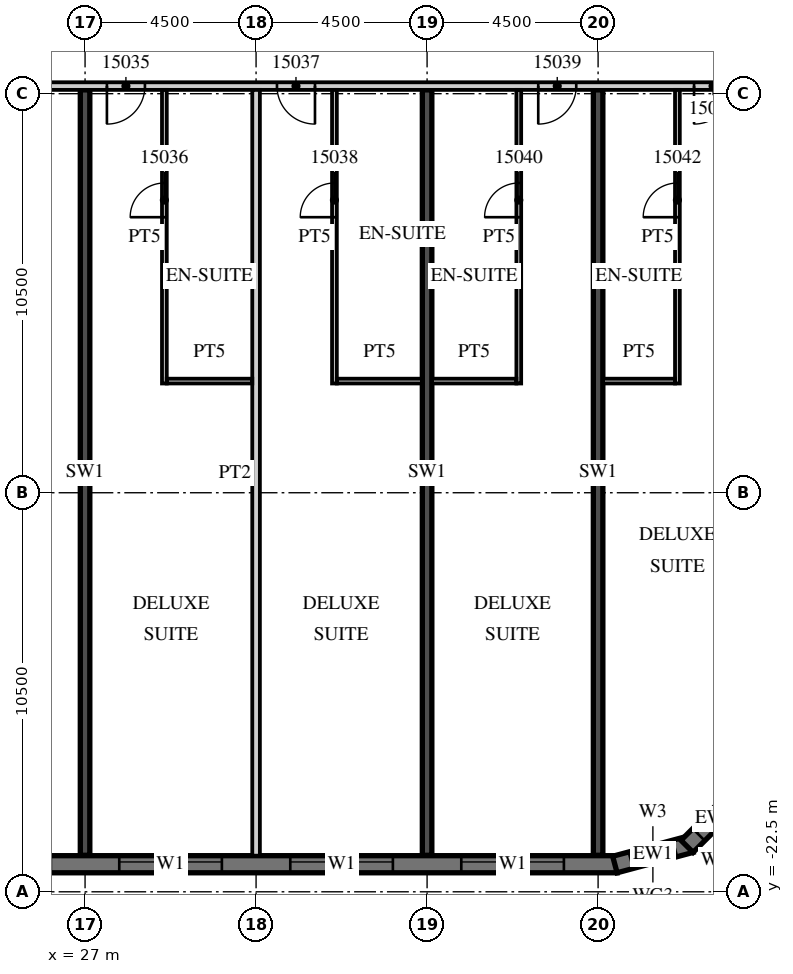
"""IFC4 building model, lengths in metres.
Left out: names, types, materials, properties, quantities, classifications, styles, units other than length and angle.
Written with IfcOpenShell. Run it as: python <this file> out.ifc"""

import sys

from ifc_helpers import new_model, si_unit, direction, frame, frame_2d, origin, place, context, subcontext, project, spatial, polyline, rectangle, outline, extrude, element, fill, save


model = new_model("IFC4")
c1 = context("Model", 3, precision=1e-05, world=origin(), true_north=direction((0.0, 1.0)))
c2 = subcontext(c1, "Body", "Model", "MODEL_VIEW")
j1 = project(units=[si_unit("LENGTHUNIT", "METRE"), si_unit("PLANEANGLEUNIT", "RADIAN")], contexts=[c1])
p1 = place(None, origin())
s1 = spatial("IfcSite", under=j1, at=p1, CompositionType="ELEMENT")
p2 = place(p1, origin())
s2 = spatial("IfcBuilding", under=s1, at=p2, CompositionType="ELEMENT")
p3 = place(p2, frame((0.0, 0.0, 79.8)))
s3 = spatial("IfcBuildingStorey", under=s2, at=p3, CompositionType="ELEMENT", Elevation=79.8)
for number, where, z_axis, x_axis in (
    (1, (27.0, -21.54, 0.0), (0.0, 0.0, 1.0), (0.0, 1.0, 0.0)),
    (2, (36.0, -21.54, 0.0), (0.0, 0.0, 1.0), (0.0, 1.0, 0.0)),
    (3, (40.5, -21.54, 0.0), (0.0, 0.0, 1.0), (0.0, 1.0, 0.0)),
):
    element("IfcWall", number, at=place(p3, frame(where, z_axis=z_axis, x_axis=x_axis)), inside=s3, PredefinedType="SHEAR", context=c2, shape_type="SweptSolid", body=[
        extrude(rectangle(XDim=20.14, YDim=0.25, at=frame_2d((10.07, 0.0))), origin(), (0.0, 0.0, 1.0), 3.3),
    ])
p4 = place(p3, frame((-13.5, -21.775, 0.0), z_axis=(0.0, 0.0, 1.0), x_axis=(1.0, 0.0, 0.0)))
e4 = element("IfcWall", 4, at=p4, inside=s3, PredefinedType="SOLIDWALL", context=c2, shape_type="SweptSolid", body=[
    extrude(rectangle(XDim=54.5, YDim=0.45, at=frame_2d((27.25, 0.0))), origin(), (0.0, 0.0, 1.0), 3.02),
])
p5 = place(p4, frame((0.9, 0.0, 0.45)))
e5 = element("IfcOpeningElement", 5, at=p5, cuts=e4, PredefinedType="OPENING", context=c2, shape_type="SweptSolid", body=[
    extrude(rectangle(XDim=2.7, YDim=2.25, at=frame_2d((1.35, 1.125))), frame((0.0, 0.235, 0.0), z_axis=(0.0, -1.0, 0.0), x_axis=(1.0, 0.0, 0.0)), (0.0, 0.0, 1.0), 0.47),
])
p6 = place(p4, frame((5.4, 0.0, 0.45)))
e6 = element("IfcOpeningElement", 6, at=p6, cuts=e4, PredefinedType="OPENING", context=c2, shape_type="SweptSolid", body=[
    extrude(rectangle(XDim=2.7, YDim=2.25, at=frame_2d((1.35, 1.125))), frame((0.0, 0.235, 0.0), z_axis=(0.0, -1.0, 0.0), x_axis=(1.0, 0.0, 0.0)), (0.0, 0.0, 1.0), 0.47),
])
p7 = place(p4, frame((9.9, 0.0, 0.45)))
e7 = element("IfcOpeningElement", 7, at=p7, cuts=e4, PredefinedType="OPENING", context=c2, shape_type="SweptSolid", body=[
    extrude(rectangle(XDim=2.7, YDim=2.25, at=frame_2d((1.35, 1.125))), frame((0.0, 0.235, 0.0), z_axis=(0.0, -1.0, 0.0), x_axis=(1.0, 0.0, 0.0)), (0.0, 0.0, 1.0), 0.47),
])
p8 = place(p4, frame((14.4, 0.0, 0.45)))
e8 = element("IfcOpeningElement", 8, at=p8, cuts=e4, PredefinedType="OPENING", context=c2, shape_type="SweptSolid", body=[
    extrude(rectangle(XDim=2.7, YDim=2.25, at=frame_2d((1.35, 1.125))), frame((0.0, 0.235, 0.0), z_axis=(0.0, -1.0, 0.0), x_axis=(1.0, 0.0, 0.0)), (0.0, 0.0, 1.0), 0.47),
])
p9 = place(p4, frame((18.9, 0.0, 0.45)))
e9 = element("IfcOpeningElement", 9, at=p9, cuts=e4, PredefinedType="OPENING", context=c2, shape_type="SweptSolid", body=[
    extrude(rectangle(XDim=2.7, YDim=2.25, at=frame_2d((1.35, 1.125))), frame((0.0, 0.235, 0.0), z_axis=(0.0, -1.0, 0.0), x_axis=(1.0, 0.0, 0.0)), (0.0, 0.0, 1.0), 0.47),
])
p10 = place(p4, frame((23.4, 0.0, 0.45)))
e10 = element("IfcOpeningElement", 10, at=p10, cuts=e4, PredefinedType="OPENING", context=c2, shape_type="SweptSolid", body=[
    extrude(rectangle(XDim=2.7, YDim=2.25, at=frame_2d((1.35, 1.125))), frame((0.0, 0.235, 0.0), z_axis=(0.0, -1.0, 0.0), x_axis=(1.0, 0.0, 0.0)), (0.0, 0.0, 1.0), 0.47),
])
p11 = place(p4, frame((27.9, 0.0, 0.45)))
e11 = element("IfcOpeningElement", 11, at=p11, cuts=e4, PredefinedType="OPENING", context=c2, shape_type="SweptSolid", body=[
    extrude(rectangle(XDim=2.7, YDim=2.25, at=frame_2d((1.35, 1.125))), frame((0.0, 0.235, 0.0), z_axis=(0.0, -1.0, 0.0), x_axis=(1.0, 0.0, 0.0)), (0.0, 0.0, 1.0), 0.47),
])
p12 = place(p4, frame((32.4, 0.0, 0.45)))
e12 = element("IfcOpeningElement", 12, at=p12, cuts=e4, PredefinedType="OPENING", context=c2, shape_type="SweptSolid", body=[
    extrude(rectangle(XDim=2.7, YDim=2.25, at=frame_2d((1.35, 1.125))), frame((0.0, 0.235, 0.0), z_axis=(0.0, -1.0, 0.0), x_axis=(1.0, 0.0, 0.0)), (0.0, 0.0, 1.0), 0.47),
])
p13 = place(p4, frame((36.9, 0.0, 0.45)))
e13 = element("IfcOpeningElement", 13, at=p13, cuts=e4, PredefinedType="OPENING", context=c2, shape_type="SweptSolid", body=[
    extrude(rectangle(XDim=2.7, YDim=2.25, at=frame_2d((1.35, 1.125))), frame((0.0, 0.235, 0.0), z_axis=(0.0, -1.0, 0.0), x_axis=(1.0, 0.0, 0.0)), (0.0, 0.0, 1.0), 0.47),
])
p14 = place(p4, frame((41.4, 0.0, 0.45)))
e14 = element("IfcOpeningElement", 14, at=p14, cuts=e4, PredefinedType="OPENING", context=c2, shape_type="SweptSolid", body=[
    extrude(rectangle(XDim=2.7, YDim=2.25, at=frame_2d((1.35, 1.125))), frame((0.0, 0.235, 0.0), z_axis=(0.0, -1.0, 0.0), x_axis=(1.0, 0.0, 0.0)), (0.0, 0.0, 1.0), 0.47),
])
p15 = place(p4, frame((45.9, 0.0, 0.45)))
e15 = element("IfcOpeningElement", 15, at=p15, cuts=e4, PredefinedType="OPENING", context=c2, shape_type="SweptSolid", body=[
    extrude(rectangle(XDim=2.7, YDim=2.25, at=frame_2d((1.35, 1.125))), frame((0.0, 0.235, 0.0), z_axis=(0.0, -1.0, 0.0), x_axis=(1.0, 0.0, 0.0)), (0.0, 0.0, 1.0), 0.47),
])
p16 = place(p4, frame((50.4, 0.0, 0.45)))
e16 = element("IfcOpeningElement", 16, at=p16, cuts=e4, PredefinedType="OPENING", context=c2, shape_type="SweptSolid", body=[
    extrude(rectangle(XDim=2.7, YDim=2.25, at=frame_2d((1.35, 1.125))), frame((0.0, 0.235, 0.0), z_axis=(0.0, -1.0, 0.0), x_axis=(1.0, 0.0, 0.0)), (0.0, 0.0, 1.0), 0.47),
])
p17 = place(p3, frame((40.942, -21.783, 0.0), z_axis=(0.0, 0.0, 1.0), x_axis=(0.965926999034, 0.25881466832, 0.0)))
e17 = element("IfcWall", 17, at=p17, inside=s3, PredefinedType="SOLIDWALL", context=c2, shape_type="SweptSolid", body=[
    extrude(outline(polyline([(0.0, -0.225), (2.071, -0.225), (1.95, 0.225), (0.121, 0.225), (0.0, -0.225)])), origin(), (0.0, 0.0, 1.0), 3.02),
])
p18 = place(p17, frame((0.435, 0.0, 0.45)))
e18 = element("IfcOpeningElement", 18, at=p18, cuts=e17, PredefinedType="OPENING", context=c2, shape_type="SweptSolid", body=[
    extrude(rectangle(XDim=1.2, YDim=2.25, at=frame_2d((0.6, 1.125))), frame((0.0, 0.235, 0.0), z_axis=(0.0, -1.0, 0.0), x_axis=(1.0, 0.0, 0.0)), (0.0, 0.0, 1.0), 0.47),
])
p19 = place(p3, frame((42.841, -21.305, 0.0), z_axis=(0.0, 0.0, 1.0), x_axis=(0.707106781187, 0.707106781187, 0.0)))
e19 = element("IfcWall", 19, at=p19, inside=s3, PredefinedType="SOLIDWALL", context=c2, shape_type="SweptSolid", body=[
    extrude(outline(polyline([(0.0, -0.225), (2.071, -0.225), (1.95, 0.225), (0.121, 0.225), (0.0, -0.225)])), origin(), (0.0, 0.0, 1.0), 3.02),
])
p20 = place(p19, frame((0.435, 0.0, 0.45)))
e20 = element("IfcOpeningElement", 20, at=p20, cuts=e19, PredefinedType="OPENING", context=c2, shape_type="SweptSolid", body=[
    extrude(rectangle(XDim=1.2, YDim=2.25, at=frame_2d((0.6, 1.125))), frame((0.0, 0.235, 0.0), z_axis=(0.0, -1.0, 0.0), x_axis=(1.0, 0.0, 0.0)), (0.0, 0.0, 1.0), 0.47),
])
p21 = place(p3, frame((-13.5, -1.3, 0.0), z_axis=(0.0, 0.0, 1.0), x_axis=(1.0, 0.0, 0.0)))
e21 = element("IfcWall", 21, at=p21, inside=s3, PredefinedType="PARTITIONING", context=c2, shape_type="SweptSolid", body=[
    extrude(rectangle(XDim=58.05, YDim=0.2, at=frame_2d((29.025, 0.0))), origin(), (0.0, 0.0, 1.0), 3.02),
])
p22 = place(p21, frame((2.925, 0.0, 0.0)))
e22 = element("IfcOpeningElement", 22, at=p22, cuts=e21, PredefinedType="OPENING", context=c2, shape_type="SweptSolid", body=[
    extrude(rectangle(XDim=1.0, YDim=2.1, at=frame_2d((0.5, 1.05))), frame((0.0, 0.11, 0.0), z_axis=(0.0, -1.0, 0.0), x_axis=(1.0, 0.0, 0.0)), (0.0, 0.0, 1.0), 0.22),
])
p23 = place(p21, frame((7.45, 0.0, 0.0)))
e23 = element("IfcOpeningElement", 23, at=p23, cuts=e21, PredefinedType="OPENING", context=c2, shape_type="SweptSolid", body=[
    extrude(rectangle(XDim=1.0, YDim=2.1, at=frame_2d((0.5, 1.05))), frame((0.0, 0.11, 0.0), z_axis=(0.0, -1.0, 0.0), x_axis=(1.0, 0.0, 0.0)), (0.0, 0.0, 1.0), 0.22),
])
p24 = place(p21, frame((11.925, 0.0, 0.0)))
e24 = element("IfcOpeningElement", 24, at=p24, cuts=e21, PredefinedType="OPENING", context=c2, shape_type="SweptSolid", body=[
    extrude(rectangle(XDim=1.0, YDim=2.1, at=frame_2d((0.5, 1.05))), frame((0.0, 0.11, 0.0), z_axis=(0.0, -1.0, 0.0), x_axis=(1.0, 0.0, 0.0)), (0.0, 0.0, 1.0), 0.22),
])
p25 = place(p21, frame((15.938, 0.0, 0.0)))
e25 = element("IfcOpeningElement", 25, at=p25, cuts=e21, PredefinedType="OPENING", context=c2, shape_type="SweptSolid", body=[
    extrude(rectangle(XDim=1.2, YDim=2.1, at=frame_2d((0.6, 1.05))), frame((0.0, 0.11, 0.0), z_axis=(0.0, -1.0, 0.0), x_axis=(1.0, 0.0, 0.0)), (0.0, 0.0, 1.0), 0.22),
])
p26 = place(p21, frame((25.45, 0.0, 0.0)))
e26 = element("IfcOpeningElement", 26, at=p26, cuts=e21, PredefinedType="OPENING", context=c2, shape_type="SweptSolid", body=[
    extrude(rectangle(XDim=1.0, YDim=2.1, at=frame_2d((0.5, 1.05))), frame((0.0, 0.11, 0.0), z_axis=(0.0, -1.0, 0.0), x_axis=(1.0, 0.0, 0.0)), (0.0, 0.0, 1.0), 0.22),
])
p27 = place(p21, frame((29.925, 0.0, 0.0)))
e27 = element("IfcOpeningElement", 27, at=p27, cuts=e21, PredefinedType="OPENING", context=c2, shape_type="SweptSolid", body=[
    extrude(rectangle(XDim=1.0, YDim=2.1, at=frame_2d((0.5, 1.05))), frame((0.0, 0.11, 0.0), z_axis=(0.0, -1.0, 0.0), x_axis=(1.0, 0.0, 0.0)), (0.0, 0.0, 1.0), 0.22),
])
p28 = place(p21, frame((36.862, 0.0, 0.0)))
e28 = element("IfcOpeningElement", 28, at=p28, cuts=e21, PredefinedType="OPENING", context=c2, shape_type="SweptSolid", body=[
    extrude(rectangle(XDim=1.2, YDim=2.1, at=frame_2d((0.6, 1.05))), frame((0.0, 0.11, 0.0), z_axis=(0.0, -1.0, 0.0), x_axis=(1.0, 0.0, 0.0)), (0.0, 0.0, 1.0), 0.22),
])
p29 = place(p21, frame((41.075, 0.0, 0.0)))
e29 = element("IfcOpeningElement", 29, at=p29, cuts=e21, PredefinedType="OPENING", context=c2, shape_type="SweptSolid", body=[
    extrude(rectangle(XDim=1.0, YDim=2.1, at=frame_2d((0.5, 1.05))), frame((0.0, 0.11, 0.0), z_axis=(0.0, -1.0, 0.0), x_axis=(1.0, 0.0, 0.0)), (0.0, 0.0, 1.0), 0.22),
])
p30 = place(p21, frame((45.55, 0.0, 0.0)))
e30 = element("IfcOpeningElement", 30, at=p30, cuts=e21, PredefinedType="OPENING", context=c2, shape_type="SweptSolid", body=[
    extrude(rectangle(XDim=1.0, YDim=2.1, at=frame_2d((0.5, 1.05))), frame((0.0, 0.11, 0.0), z_axis=(0.0, -1.0, 0.0), x_axis=(1.0, 0.0, 0.0)), (0.0, 0.0, 1.0), 0.22),
])
p31 = place(p21, frame((52.425, 0.0, 0.0)))
e31 = element("IfcOpeningElement", 31, at=p31, cuts=e21, PredefinedType="OPENING", context=c2, shape_type="SweptSolid", body=[
    extrude(rectangle(XDim=1.0, YDim=2.1, at=frame_2d((0.5, 1.05))), frame((0.0, 0.11, 0.0), z_axis=(0.0, -1.0, 0.0), x_axis=(1.0, 0.0, 0.0)), (0.0, 0.0, 1.0), 0.22),
])
p32 = place(p21, frame((56.525, 0.0, 0.0)))
e32 = element("IfcOpeningElement", 32, at=p32, cuts=e21, PredefinedType="OPENING", context=c2, shape_type="SweptSolid", body=[
    extrude(rectangle(XDim=1.0, YDim=2.1, at=frame_2d((0.5, 1.05))), frame((0.0, 0.11, 0.0), z_axis=(0.0, -1.0, 0.0), x_axis=(1.0, 0.0, 0.0)), (0.0, 0.0, 1.0), 0.22),
])
p33 = place(p3, frame((31.5, -21.55, 0.0), z_axis=(0.0, 0.0, 1.0), x_axis=(0.0, 1.0, 0.0)))
e33 = element("IfcWall", 33, at=p33, inside=s3, PredefinedType="PARTITIONING", context=c2, shape_type="SweptSolid", body=[
    extrude(rectangle(XDim=20.15, YDim=0.2, at=frame_2d((10.075, 0.0))), origin(), (0.0, 0.0, 1.0), 3.02),
])
p34 = place(p3, frame((29.087, -9.125, 0.0), z_axis=(0.0, 0.0, 1.0), x_axis=(0.0, 1.0, 0.0)))
e34 = element("IfcWall", 34, at=p34, inside=s3, PredefinedType="PARTITIONING", context=c2, shape_type="SweptSolid", body=[
    extrude(rectangle(XDim=7.725, YDim=0.125, at=frame_2d((3.863, 0.0))), origin(), (0.0, 0.0, 1.0), 3.02),
])
p35 = place(p34, frame((4.375, 0.0, 0.0)))
e35 = element("IfcOpeningElement", 35, at=p35, cuts=e34, PredefinedType="OPENING", context=c2, shape_type="SweptSolid", body=[
    extrude(rectangle(XDim=0.9, YDim=2.1, at=frame_2d((0.45, 1.05))), frame((0.0, 0.073, 0.0), z_axis=(0.0, -1.0, 0.0), x_axis=(1.0, 0.0, 0.0)), (0.0, 0.0, 1.0), 0.145),
])
p36 = place(p3, frame((29.15, -9.062, 0.0), z_axis=(0.0, 0.0, 1.0), x_axis=(1.0, 0.0, 0.0)))
e36 = element("IfcWall", 36, at=p36, inside=s3, PredefinedType="PARTITIONING", context=c2, shape_type="SweptSolid", body=[
    extrude(rectangle(XDim=2.25, YDim=0.125, at=frame_2d((1.125, 0.0))), origin(), (0.0, 0.0, 1.0), 3.02),
])
p37 = place(p3, frame((33.562, -9.125, 0.0), z_axis=(0.0, 0.0, 1.0), x_axis=(0.0, 1.0, 0.0)))
e37 = element("IfcWall", 37, at=p37, inside=s3, PredefinedType="PARTITIONING", context=c2, shape_type="SweptSolid", body=[
    extrude(rectangle(XDim=7.725, YDim=0.125, at=frame_2d((3.863, 0.0))), origin(), (0.0, 0.0, 1.0), 3.02),
])
p38 = place(p37, frame((4.375, 0.0, 0.0)))
e38 = element("IfcOpeningElement", 38, at=p38, cuts=e37, PredefinedType="OPENING", context=c2, shape_type="SweptSolid", body=[
    extrude(rectangle(XDim=0.9, YDim=2.1, at=frame_2d((0.45, 1.05))), frame((0.0, 0.073, 0.0), z_axis=(0.0, -1.0, 0.0), x_axis=(1.0, 0.0, 0.0)), (0.0, 0.0, 1.0), 0.145),
])
p39 = place(p3, frame((33.625, -9.062, 0.0), z_axis=(0.0, 0.0, 1.0), x_axis=(1.0, 0.0, 0.0)))
e39 = element("IfcWall", 39, at=p39, inside=s3, PredefinedType="PARTITIONING", context=c2, shape_type="SweptSolid", body=[
    extrude(rectangle(XDim=2.25, YDim=0.125, at=frame_2d((1.125, 0.0))), origin(), (0.0, 0.0, 1.0), 3.02),
])
p40 = place(p3, frame((38.413, -9.125, 0.0), z_axis=(0.0, 0.0, 1.0), x_axis=(0.0, 1.0, 0.0)))
e40 = element("IfcWall", 40, at=p40, inside=s3, PredefinedType="PARTITIONING", context=c2, shape_type="SweptSolid", body=[
    extrude(rectangle(XDim=7.725, YDim=0.125, at=frame_2d((3.863, 0.0))), origin(), (0.0, 0.0, 1.0), 3.02),
])
p41 = place(p40, frame((4.375, 0.0, 0.0)))
e41 = element("IfcOpeningElement", 41, at=p41, cuts=e40, PredefinedType="OPENING", context=c2, shape_type="SweptSolid", body=[
    extrude(rectangle(XDim=0.9, YDim=2.1, at=frame_2d((0.45, 1.05))), frame((0.0, 0.073, 0.0), z_axis=(0.0, -1.0, 0.0), x_axis=(1.0, 0.0, 0.0)), (0.0, 0.0, 1.0), 0.145),
])
p42 = place(p3, frame((36.125, -9.062, 0.0), z_axis=(0.0, 0.0, 1.0), x_axis=(1.0, 0.0, 0.0)))
e42 = element("IfcWall", 42, at=p42, inside=s3, PredefinedType="PARTITIONING", context=c2, shape_type="SweptSolid", body=[
    extrude(rectangle(XDim=2.225, YDim=0.125, at=frame_2d((1.113, 0.0))), origin(), (0.0, 0.0, 1.0), 3.02),
])
p43 = place(p3, frame((42.587, -9.125, 0.0), z_axis=(0.0, 0.0, 1.0), x_axis=(0.0, 1.0, 0.0)))
e43 = element("IfcWall", 43, at=p43, inside=s3, PredefinedType="PARTITIONING", context=c2, shape_type="SweptSolid", body=[
    extrude(rectangle(XDim=7.725, YDim=0.125, at=frame_2d((3.863, 0.0))), origin(), (0.0, 0.0, 1.0), 3.02),
])
p44 = place(p43, frame((4.375, 0.0, 0.0)))
e44 = element("IfcOpeningElement", 44, at=p44, cuts=e43, PredefinedType="OPENING", context=c2, shape_type="SweptSolid", body=[
    extrude(rectangle(XDim=0.9, YDim=2.1, at=frame_2d((0.45, 1.05))), frame((0.0, 0.073, 0.0), z_axis=(0.0, -1.0, 0.0), x_axis=(1.0, 0.0, 0.0)), (0.0, 0.0, 1.0), 0.145),
])
p45 = place(p3, frame((40.625, -9.062, 0.0), z_axis=(0.0, 0.0, 1.0), x_axis=(1.0, 0.0, 0.0)))
e45 = element("IfcWall", 45, at=p45, inside=s3, PredefinedType="PARTITIONING", context=c2, shape_type="SweptSolid", body=[
    extrude(rectangle(XDim=1.9, YDim=0.125, at=frame_2d((0.95, 0.0))), origin(), (0.0, 0.0, 1.0), 3.02),
])
p46 = place(p14, origin())
e46 = element("IfcWindow", 46, at=p46, inside=s3, PartitioningType="SINGLE_PANEL", PredefinedType="WINDOW", context=c2, shape_type="SweptSolid", body=[
    extrude(rectangle(XDim=2.7, YDim=2.25, at=frame_2d((1.35, 1.125))), frame((0.0, 0.09, 0.0), z_axis=(0.0, -1.0, 0.0), x_axis=(1.0, 0.0, 0.0)), (0.0, 0.0, 1.0), 0.06),
])
fill(e14, e46)
p47 = place(p15, origin())
e47 = element("IfcWindow", 47, at=p47, inside=s3, PartitioningType="SINGLE_PANEL", PredefinedType="WINDOW", context=c2, shape_type="SweptSolid", body=[
    extrude(rectangle(XDim=2.7, YDim=2.25, at=frame_2d((1.35, 1.125))), frame((0.0, 0.09, 0.0), z_axis=(0.0, -1.0, 0.0), x_axis=(1.0, 0.0, 0.0)), (0.0, 0.0, 1.0), 0.06),
])
fill(e15, e47)
p48 = place(p16, origin())
e48 = element("IfcWindow", 48, at=p48, inside=s3, PartitioningType="SINGLE_PANEL", PredefinedType="WINDOW", context=c2, shape_type="SweptSolid", body=[
    extrude(rectangle(XDim=2.7, YDim=2.25, at=frame_2d((1.35, 1.125))), frame((0.0, 0.09, 0.0), z_axis=(0.0, -1.0, 0.0), x_axis=(1.0, 0.0, 0.0)), (0.0, 0.0, 1.0), 0.06),
])
fill(e16, e48)
p49 = place(p18, origin())
e49 = element("IfcWindow", 49, at=p49, inside=s3, PartitioningType="SINGLE_PANEL", PredefinedType="WINDOW", context=c2, shape_type="SweptSolid", body=[
    extrude(rectangle(XDim=1.2, YDim=2.25, at=frame_2d((0.6, 1.125))), frame((0.0, 0.09, 0.0), z_axis=(0.0, -1.0, 0.0), x_axis=(1.0, 0.0, 0.0)), (0.0, 0.0, 1.0), 0.06),
])
fill(e18, e49)
p50 = place(p20, origin())
e50 = element("IfcWindow", 50, at=p50, inside=s3, PartitioningType="SINGLE_PANEL", PredefinedType="WINDOW", context=c2, shape_type="SweptSolid", body=[
    extrude(rectangle(XDim=1.2, YDim=2.25, at=frame_2d((0.6, 1.125))), frame((0.0, 0.09, 0.0), z_axis=(0.0, -1.0, 0.0), x_axis=(1.0, 0.0, 0.0)), (0.0, 0.0, 1.0), 0.06),
])
fill(e20, e50)
p51 = place(p29, origin())
e51 = element("IfcDoor", 51, at=p51, inside=s3, OperationType="SINGLE_SWING_LEFT", PredefinedType="DOOR", context=c2, shape_type="SweptSolid", body=[
    extrude(rectangle(XDim=1.0, YDim=2.1, at=frame_2d((0.5, 1.05))), frame((0.0, 0.025, 0.0), z_axis=(0.0, -1.0, 0.0), x_axis=(1.0, 0.0, 0.0)), (0.0, 0.0, 1.0), 0.05),
])
fill(e29, e51)
p52 = place(p35, origin())
e52 = element("IfcDoor", 52, at=p52, inside=s3, OperationType="SINGLE_SWING_LEFT", PredefinedType="DOOR", context=c2, shape_type="SweptSolid", body=[
    extrude(rectangle(XDim=0.9, YDim=2.1, at=frame_2d((0.45, 1.05))), frame((0.0, 0.025, 0.0), z_axis=(0.0, -1.0, 0.0), x_axis=(1.0, 0.0, 0.0)), (0.0, 0.0, 1.0), 0.05),
])
fill(e35, e52)
p53 = place(p30, origin())
e53 = element("IfcDoor", 53, at=p53, inside=s3, OperationType="SINGLE_SWING_RIGHT", PredefinedType="DOOR", context=c2, shape_type="SweptSolid", body=[
    extrude(rectangle(XDim=1.0, YDim=2.1, at=frame_2d((0.5, 1.05))), frame((0.0, 0.025, 0.0), z_axis=(0.0, -1.0, 0.0), x_axis=(1.0, 0.0, 0.0)), (0.0, 0.0, 1.0), 0.05),
])
fill(e30, e53)
p54 = place(p38, origin())
e54 = element("IfcDoor", 54, at=p54, inside=s3, OperationType="SINGLE_SWING_LEFT", PredefinedType="DOOR", context=c2, shape_type="SweptSolid", body=[
    extrude(rectangle(XDim=0.9, YDim=2.1, at=frame_2d((0.45, 1.05))), frame((0.0, 0.025, 0.0), z_axis=(0.0, -1.0, 0.0), x_axis=(1.0, 0.0, 0.0)), (0.0, 0.0, 1.0), 0.05),
])
fill(e38, e54)
p55 = place(p31, origin())
e55 = element("IfcDoor", 55, at=p55, inside=s3, OperationType="SINGLE_SWING_LEFT", PredefinedType="DOOR", context=c2, shape_type="SweptSolid", body=[
    extrude(rectangle(XDim=1.0, YDim=2.1, at=frame_2d((0.5, 1.05))), frame((0.0, 0.025, 0.0), z_axis=(0.0, -1.0, 0.0), x_axis=(1.0, 0.0, 0.0)), (0.0, 0.0, 1.0), 0.05),
])
fill(e31, e55)
p56 = place(p41, origin())
e56 = element("IfcDoor", 56, at=p56, inside=s3, OperationType="SINGLE_SWING_LEFT", PredefinedType="DOOR", context=c2, shape_type="SweptSolid", body=[
    extrude(rectangle(XDim=0.9, YDim=2.1, at=frame_2d((0.45, 1.05))), frame((0.0, 0.025, 0.0), z_axis=(0.0, -1.0, 0.0), x_axis=(1.0, 0.0, 0.0)), (0.0, 0.0, 1.0), 0.05),
])
fill(e41, e56)
p57 = place(p32, origin())
e57 = element("IfcDoor", 57, at=p57, inside=s3, OperationType="SINGLE_SWING_LEFT", PredefinedType="DOOR", context=c2, shape_type="SweptSolid", body=[
    extrude(rectangle(XDim=1.0, YDim=2.1, at=frame_2d((0.5, 1.05))), frame((0.0, 0.025, 0.0), z_axis=(0.0, -1.0, 0.0), x_axis=(1.0, 0.0, 0.0)), (0.0, 0.0, 1.0), 0.05),
])
fill(e32, e57)
p58 = place(p44, origin())
e58 = element("IfcDoor", 58, at=p58, inside=s3, OperationType="SINGLE_SWING_LEFT", PredefinedType="DOOR", context=c2, shape_type="SweptSolid", body=[
    extrude(rectangle(XDim=0.9, YDim=2.1, at=frame_2d((0.45, 1.05))), frame((0.0, 0.025, 0.0), z_axis=(0.0, -1.0, 0.0), x_axis=(1.0, 0.0, 0.0)), (0.0, 0.0, 1.0), 0.05),
])
fill(e44, e58)
save(model, sys.argv[1])
